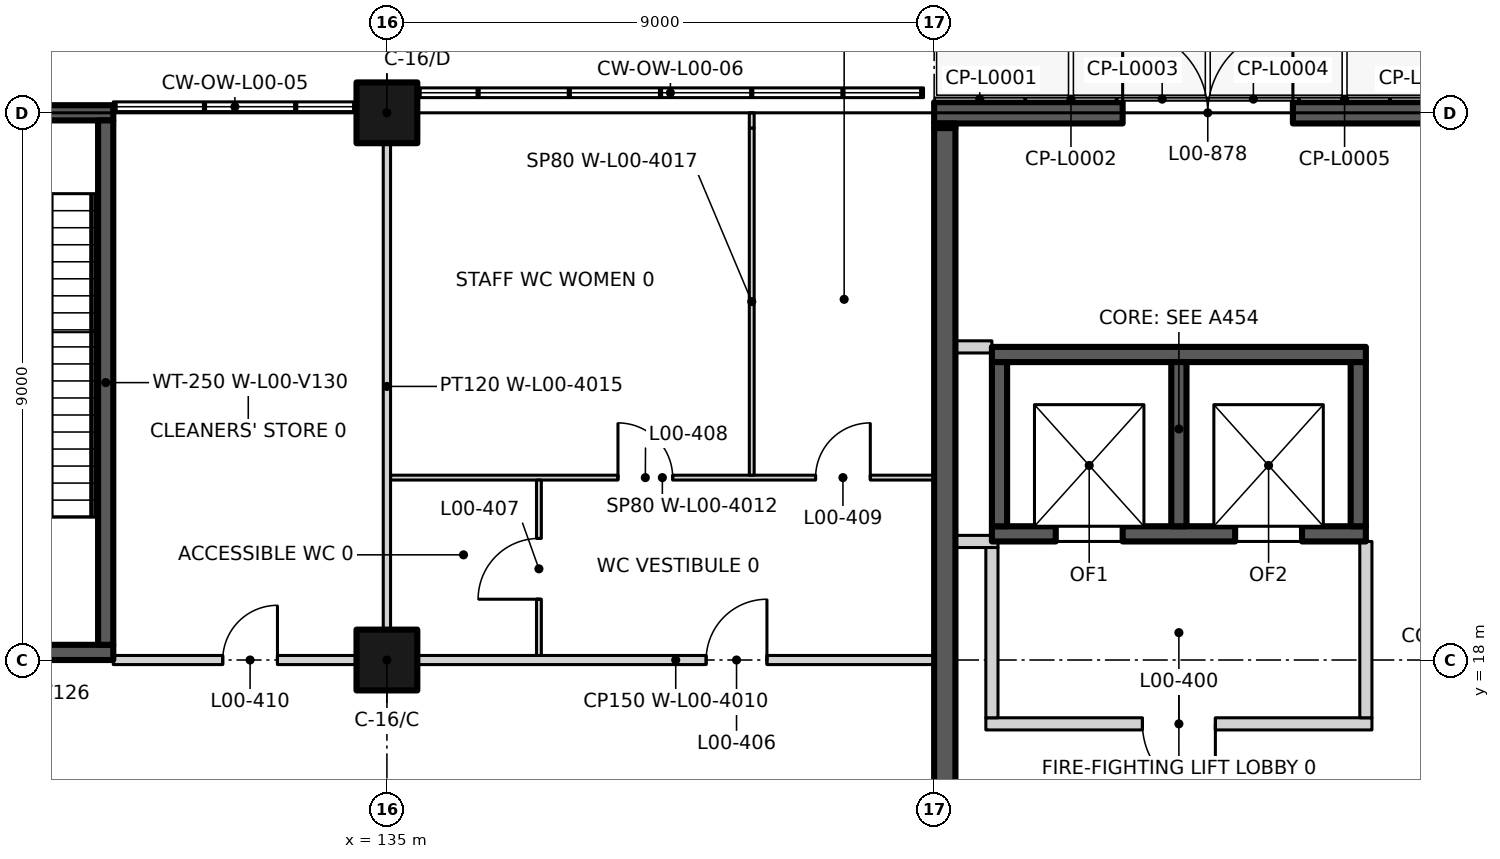
"""IFC4 building model, lengths in metres.
Left out: names, types, materials, properties, quantities, classifications, styles, units other than length and angle.
Written with IfcOpenShell. Run it as: python <this file> out.ifc"""

import sys

from ifc_helpers import new_model, si_unit, direction, frame, frame_2d, origin, origin_2d, place, context, subcontext, project, spatial, rectangle, extrude, element, fill, save


model = new_model("IFC4")
c1 = context("Model", 3, precision=1e-05, world=origin(), true_north=direction((0.0, 1.0)))
c2 = subcontext(c1, "Body", "Model", "MODEL_VIEW")
j1 = project(units=[si_unit("LENGTHUNIT", "METRE"), si_unit("PLANEANGLEUNIT", "RADIAN")], contexts=[c1])
p1 = place(None, origin())
s1 = spatial("IfcSite", under=j1, at=p1, CompositionType="ELEMENT")
p2 = place(p1, origin())
s2 = spatial("IfcBuilding", under=s1, at=p2, CompositionType="ELEMENT")
p3 = place(p2, origin())
s3 = spatial("IfcBuildingStorey", under=s2, at=p3, CompositionType="ELEMENT", Elevation=0.0)
for number, where, z_axis, x_axis in (
    (1, (135.0, 18.0, 0.0), (0.0, 0.0, 1.0), (1.0, 0.0, 0.0)),
    (2, (135.0, 27.0, 0.0), (0.0, 0.0, 1.0), (1.0, 0.0, 0.0)),
):
    element("IfcColumn", number, at=place(p3, frame(where, z_axis=z_axis, x_axis=x_axis)), inside=s3, PredefinedType="COLUMN", context=c2, shape_type="SweptSolid", body=[
        extrude(rectangle(XDim=1.0, YDim=1.0, at=origin_2d()), origin(), (0.0, 0.0, 1.0), 6.0),
    ])
p4 = place(p3, frame((126.5, 18.125, 0.0), z_axis=(0.0, 0.0, 1.0), x_axis=(1.0, 0.0, 0.0)))
e3 = element("IfcWall", 3, at=p4, inside=s3, PredefinedType="SHEAR", context=c2, shape_type="SweptSolid", body=[
    extrude(rectangle(XDim=4.0, YDim=0.25, at=frame_2d((2.0, 0.0))), origin(), (0.0, 0.0, 1.0), 6.0),
])
p5 = place(p4, frame((1.2, 0.0, 0.0)))
e4 = element("IfcOpeningElement", 4, at=p5, cuts=e3, PredefinedType="OPENING", context=c2, shape_type="SweptSolid", body=[
    extrude(rectangle(XDim=1.1, YDim=2.1, at=frame_2d((0.55, 1.05))), frame((0.0, 0.135, 0.0), z_axis=(0.0, -1.0, 0.0), x_axis=(1.0, 0.0, 0.0)), (0.0, 0.0, 1.0), 0.27),
])
p6 = place(p3, frame((128.188, 27.0, 0.0), z_axis=(0.0, 0.0, 1.0), x_axis=(1.0, 0.0, 0.0)))
e5 = element("IfcWall", 5, at=p6, inside=s3, PredefinedType="SHEAR", context=c2, shape_type="SweptSolid", body=[
    extrude(rectangle(XDim=2.312, YDim=0.25, at=frame_2d((1.156, 0.0))), origin(), (0.0, 0.0, 1.0), 6.0),
])
p7 = place(p3, frame((130.375, 18.25, 0.0), z_axis=(0.0, 0.0, 1.0), x_axis=(0.0, 1.0, 0.0)))
e6 = element("IfcWall", 6, at=p7, inside=s3, PredefinedType="SHEAR", context=c2, shape_type="SweptSolid", body=[
    extrude(rectangle(XDim=8.625, YDim=0.25, at=frame_2d((4.312, 0.0))), origin(), (0.0, 0.0, 1.0), 6.0),
])
p8 = place(p3, frame((144.95, 20.075, 0.0), z_axis=(0.0, 0.0, 1.0), x_axis=(1.0, 0.0, 0.0)))
e7 = element("IfcWall", 7, at=p8, inside=s3, PredefinedType="SHEAR", context=c2, shape_type="SweptSolid", body=[
    extrude(rectangle(XDim=6.15, YDim=0.25, at=frame_2d((3.075, 0.0))), origin(), (0.0, 0.0, 1.0), 6.0),
])
p9 = place(p8, frame((1.05, 0.0, 0.0)))
e8 = element("IfcOpeningElement", 8, at=p9, cuts=e7, PredefinedType="OPENING", context=c2, shape_type="SweptSolid", body=[
    extrude(rectangle(XDim=1.1, YDim=2.1, at=frame_2d((0.55, 1.05))), frame((0.0, 0.135, 0.0), z_axis=(0.0, -1.0, 0.0), x_axis=(1.0, 0.0, 0.0)), (0.0, 0.0, 1.0), 0.27),
])
p10 = place(p8, frame((4.0, 0.0, 0.0)))
e9 = element("IfcOpeningElement", 9, at=p10, cuts=e7, PredefinedType="OPENING", context=c2, shape_type="SweptSolid", body=[
    extrude(rectangle(XDim=1.1, YDim=2.1, at=frame_2d((0.55, 1.05))), frame((0.0, 0.135, 0.0), z_axis=(0.0, -1.0, 0.0), x_axis=(1.0, 0.0, 0.0)), (0.0, 0.0, 1.0), 0.27),
])
p11 = place(p3, frame((144.95, 23.025, 0.0), z_axis=(0.0, 0.0, 1.0), x_axis=(1.0, 0.0, 0.0)))
e10 = element("IfcWall", 10, at=p11, inside=s3, PredefinedType="SHEAR", context=c2, shape_type="SweptSolid", body=[
    extrude(rectangle(XDim=6.15, YDim=0.25, at=frame_2d((3.075, 0.0))), origin(), (0.0, 0.0, 1.0), 6.0),
])
for number, where, z_axis, x_axis in (
    (11, (145.075, 20.2, 0.0), (0.0, 0.0, 1.0), (0.0, 1.0, 0.0)),
    (12, (148.025, 20.2, 0.0), (0.0, 0.0, 1.0), (0.0, 1.0, 0.0)),
    (13, (150.975, 20.2, 0.0), (0.0, 0.0, 1.0), (0.0, 1.0, 0.0)),
):
    element("IfcWall", number, at=place(p3, frame(where, z_axis=z_axis, x_axis=x_axis)), inside=s3, PredefinedType="SHEAR", context=c2, shape_type="SweptSolid", body=[
        extrude(rectangle(XDim=2.7, YDim=0.25, at=frame_2d((1.35, 0.0))), origin(), (0.0, 0.0, 1.0), 6.0),
    ])
p12 = place(p3, frame((144.0, 27.0, 0.0), z_axis=(0.0, 0.0, 1.0), x_axis=(1.0, 0.0, 0.0)))
e14 = element("IfcWall", 14, at=p12, inside=s3, PredefinedType="SOLIDWALL", context=c2, shape_type="SweptSolid", body=[
    extrude(rectangle(XDim=18.0, YDim=0.35, at=frame_2d((9.0, 0.0))), origin(), (0.0, 0.0, 1.0), 5.1),
])
p13 = place(p12, frame((3.1, 0.0, 0.0)))
e15 = element("IfcOpeningElement", 15, at=p13, cuts=e14, PredefinedType="OPENING", context=c2, shape_type="SweptSolid", body=[
    extrude(rectangle(XDim=2.8, YDim=2.4, at=frame_2d((1.4, 1.2))), frame((0.0, 0.185, 0.0), z_axis=(0.0, -1.0, 0.0), x_axis=(1.0, 0.0, 0.0)), (0.0, 0.0, 1.0), 0.37),
])
p14 = place(p12, frame((13.2, 0.0, 0.6)))
e16 = element("IfcOpeningElement", 16, at=p14, cuts=e14, PredefinedType="OPENING", context=c2, shape_type="SweptSolid", body=[
    extrude(rectangle(XDim=0.6, YDim=2.4, at=frame_2d((0.3, 1.2))), frame((0.0, 0.185, 0.0), z_axis=(0.0, -1.0, 0.0), x_axis=(1.0, 0.0, 0.0)), (0.0, 0.0, 1.0), 0.37),
])
p15 = place(p3, frame((144.85, 16.95, 0.0), z_axis=(0.0, 0.0, 1.0), x_axis=(1.0, 0.0, 0.0)))
e17 = element("IfcWall", 17, at=p15, inside=s3, PredefinedType="PARTITIONING", context=c2, shape_type="SweptSolid", body=[
    extrude(rectangle(XDim=6.35, YDim=0.2, at=frame_2d((3.175, 0.0))), origin(), (0.0, 0.0, 1.0), 5.7),
])
p16 = place(p15, frame((3.775, 0.0, 0.0), z_axis=(0.0, 0.0, 1.0), x_axis=(-1.0, 0.0, 0.0)))
e18 = element("IfcOpeningElement", 18, at=p16, cuts=e17, PredefinedType="OPENING", context=c2, shape_type="SweptSolid", body=[
    extrude(rectangle(XDim=1.2, YDim=2.1, at=frame_2d((0.6, 1.05))), frame((0.0, 0.11, 0.0), z_axis=(0.0, -1.0, 0.0), x_axis=(1.0, 0.0, 0.0)), (0.0, 0.0, 1.0), 0.22),
])
p17 = place(p3, frame((130.5, 18.0, 0.0), z_axis=(0.0, 0.0, 1.0), x_axis=(1.0, 0.0, 0.0)))
e19 = element("IfcWall", 19, at=p17, inside=s3, PredefinedType="PARTITIONING", context=c2, shape_type="SweptSolid", body=[
    extrude(rectangle(XDim=4.0, YDim=0.15, at=frame_2d((2.0, 0.0))), origin(), (0.0, 0.0, 1.0), 5.7),
])
p18 = place(p17, frame((1.8, 0.0, 0.0)))
e20 = element("IfcOpeningElement", 20, at=p18, cuts=e19, PredefinedType="OPENING", context=c2, shape_type="SweptSolid", body=[
    extrude(rectangle(XDim=0.9, YDim=2.1, at=frame_2d((0.45, 1.05))), frame((0.0, 0.085, 0.0), z_axis=(0.0, -1.0, 0.0), x_axis=(1.0, 0.0, 0.0)), (0.0, 0.0, 1.0), 0.17),
])
p19 = place(p3, frame((135.5, 18.0, 0.0), z_axis=(0.0, 0.0, 1.0), x_axis=(1.0, 0.0, 0.0)))
e21 = element("IfcWall", 21, at=p19, inside=s3, PredefinedType="PARTITIONING", context=c2, shape_type="SweptSolid", body=[
    extrude(rectangle(XDim=8.5, YDim=0.15, at=frame_2d((4.25, 0.0))), origin(), (0.0, 0.0, 1.0), 5.7),
])
p20 = place(p19, frame((4.75, 0.0, 0.0)))
e22 = element("IfcOpeningElement", 22, at=p20, cuts=e21, PredefinedType="OPENING", context=c2, shape_type="SweptSolid", body=[
    extrude(rectangle(XDim=1.0, YDim=2.1, at=frame_2d((0.5, 1.05))), frame((0.0, 0.085, 0.0), z_axis=(0.0, -1.0, 0.0), x_axis=(1.0, 0.0, 0.0)), (0.0, 0.0, 1.0), 0.17),
])
p21 = place(p3, frame((144.35, 19.95, 0.0), z_axis=(0.0, 0.0, 1.0), x_axis=(1.0, 0.0, 0.0)))
e23 = element("IfcWall", 23, at=p21, inside=s3, PredefinedType="PARTITIONING", context=c2, shape_type="SweptSolid", body=[
    extrude(rectangle(XDim=0.7, YDim=0.2, at=frame_2d((0.35, 0.0))), origin(), (0.0, 0.0, 1.0), 5.7),
])
p22 = place(p3, frame((135.06, 21.0, 0.0), z_axis=(0.0, 0.0, 1.0), x_axis=(1.0, 0.0, 0.0)))
e24 = element("IfcWall", 24, at=p22, inside=s3, PredefinedType="PARTITIONING", context=c2, shape_type="SweptSolid", body=[
    extrude(rectangle(XDim=8.94, YDim=0.08, at=frame_2d((4.47, 0.0))), origin(), (0.0, 0.0, 1.0), 5.7),
])
p23 = place(p22, frame((3.74, 0.0, 0.0)))
e25 = element("IfcOpeningElement", 25, at=p23, cuts=e24, PredefinedType="OPENING", context=c2, shape_type="SweptSolid", body=[
    extrude(rectangle(XDim=0.9, YDim=2.1, at=frame_2d((0.45, 1.05))), frame((0.0, 0.05, 0.0), z_axis=(0.0, -1.0, 0.0), x_axis=(1.0, 0.0, 0.0)), (0.0, 0.0, 1.0), 0.1),
])
p24 = place(p22, frame((6.99, 0.0, 0.0)))
e26 = element("IfcOpeningElement", 26, at=p24, cuts=e24, PredefinedType="OPENING", context=c2, shape_type="SweptSolid", body=[
    extrude(rectangle(XDim=0.9, YDim=2.1, at=frame_2d((0.45, 1.05))), frame((0.0, 0.05, 0.0), z_axis=(0.0, -1.0, 0.0), x_axis=(1.0, 0.0, 0.0)), (0.0, 0.0, 1.0), 0.1),
])
p25 = place(p3, frame((144.35, 23.15, 0.0), z_axis=(0.0, 0.0, 1.0), x_axis=(1.0, 0.0, 0.0)))
e27 = element("IfcWall", 27, at=p25, inside=s3, PredefinedType="PARTITIONING", context=c2, shape_type="SweptSolid", body=[
    extrude(rectangle(XDim=0.6, YDim=0.2, at=frame_2d((0.3, 0.0))), origin(), (0.0, 0.0, 1.0), 5.7),
])
p26 = place(p3, frame((135.0, 18.5, 0.0), z_axis=(0.0, 0.0, 1.0), x_axis=(0.0, 1.0, 0.0)))
e28 = element("IfcWall", 28, at=p26, inside=s3, PredefinedType="PARTITIONING", context=c2, shape_type="SweptSolid", body=[
    extrude(rectangle(XDim=8.0, YDim=0.12, at=frame_2d((4.0, 0.0))), origin(), (0.0, 0.0, 1.0), 5.7),
])
p27 = place(p3, frame((137.5, 18.075, 0.0), z_axis=(0.0, 0.0, 1.0), x_axis=(0.0, 1.0, 0.0)))
e29 = element("IfcWall", 29, at=p27, inside=s3, PredefinedType="PARTITIONING", context=c2, shape_type="SweptSolid", body=[
    extrude(rectangle(XDim=2.885, YDim=0.08, at=frame_2d((1.442, 0.0))), origin(), (0.0, 0.0, 1.0), 5.7),
])
p28 = place(p27, frame((0.925, 0.0, 0.0)))
e30 = element("IfcOpeningElement", 30, at=p28, cuts=e29, PredefinedType="OPENING", context=c2, shape_type="SweptSolid", body=[
    extrude(rectangle(XDim=1.0, YDim=2.1, at=frame_2d((0.5, 1.05))), frame((0.0, 0.05, 0.0), z_axis=(0.0, -1.0, 0.0), x_axis=(1.0, 0.0, 0.0)), (0.0, 0.0, 1.0), 0.1),
])
p29 = place(p3, frame((141.0, 21.04, 0.0), z_axis=(0.0, 0.0, 1.0), x_axis=(0.0, 1.0, 0.0)))
e31 = element("IfcWall", 31, at=p29, inside=s3, PredefinedType="PARTITIONING", context=c2, shape_type="SweptSolid", body=[
    extrude(rectangle(XDim=5.71, YDim=0.08, at=frame_2d((2.855, 0.0))), origin(), (0.0, 0.0, 1.0), 5.7),
])
p30 = place(p3, frame((141.0, 26.75, 0.0), z_axis=(0.0, 0.0, 1.0), x_axis=(0.0, 1.0, 0.0)))
e32 = element("IfcWall", 32, at=p30, inside=s3, PredefinedType="PARTITIONING", context=c2, shape_type="SweptSolid", body=[
    extrude(rectangle(XDim=0.25, YDim=0.08, at=frame_2d((0.125, 0.0))), origin(), (0.0, 0.0, 1.0), 5.1),
])
p31 = place(p3, frame((144.175, 9.35, 0.0), z_axis=(0.0, 0.0, 1.0), x_axis=(0.0, 1.0, 0.0)))
e33 = element("IfcWall", 33, at=p31, inside=s3, PredefinedType="SHEAR", context=c2, shape_type="SweptSolid", body=[
    extrude(rectangle(XDim=17.4, YDim=0.35, at=frame_2d((8.7, 0.0))), origin(), (0.0, 0.0, 1.0), 5.7),
])
p32 = place(p31, frame((3.75, 0.0, 0.0)))
e34 = element("IfcOpeningElement", 34, at=p32, cuts=e33, PredefinedType="OPENING", context=c2, shape_type="SweptSolid", body=[
    extrude(rectangle(XDim=1.6, YDim=2.4, at=frame_2d((0.8, 1.2))), frame((0.0, 0.185, 0.0), z_axis=(0.0, -1.0, 0.0), x_axis=(1.0, 0.0, 0.0)), (0.0, 0.0, 1.0), 0.37),
])
p33 = place(p3, frame((144.175, 26.75, 0.0), z_axis=(0.0, 0.0, 1.0), x_axis=(0.0, 1.0, 0.0)))
e35 = element("IfcWall", 35, at=p33, inside=s3, PredefinedType="SHEAR", context=c2, shape_type="SweptSolid", body=[
    extrude(rectangle(XDim=0.075, YDim=0.35, at=frame_2d((0.038, 0.0))), origin(), (0.0, 0.0, 1.0), 5.1),
])
p34 = place(p3, frame((144.95, 17.05, 0.0), z_axis=(0.0, 0.0, 1.0), x_axis=(0.0, 1.0, 0.0)))
e36 = element("IfcWall", 36, at=p34, inside=s3, PredefinedType="PARTITIONING", context=c2, shape_type="SweptSolid", body=[
    extrude(rectangle(XDim=2.8, YDim=0.2, at=frame_2d((1.4, 0.0))), origin(), (0.0, 0.0, 1.0), 5.7),
])
p35 = place(p3, frame((151.1, 17.05, 0.0), z_axis=(0.0, 0.0, 1.0), x_axis=(0.0, 1.0, 0.0)))
e37 = element("IfcWall", 37, at=p35, inside=s3, PredefinedType="PARTITIONING", context=c2, shape_type="SweptSolid", body=[
    extrude(rectangle(XDim=2.9, YDim=0.2, at=frame_2d((1.45, 0.0))), origin(), (0.0, 0.0, 1.0), 5.7),
])
p36 = place(p9, origin())
e38 = element("IfcDoor", 38, at=p36, inside=s3, OperationType="DOUBLE_DOOR_SLIDING", PredefinedType="DOOR", context=c2, shape_type="SweptSolid", body=[
    extrude(rectangle(XDim=1.1, YDim=2.1, at=frame_2d((0.55, 1.05))), frame((0.0, 0.025, 0.0), z_axis=(0.0, -1.0, 0.0), x_axis=(1.0, 0.0, 0.0)), (0.0, 0.0, 1.0), 0.05),
])
fill(e8, e38)
p37 = place(p10, origin())
e39 = element("IfcDoor", 39, at=p37, inside=s3, OperationType="DOUBLE_DOOR_SLIDING", PredefinedType="DOOR", context=c2, shape_type="SweptSolid", body=[
    extrude(rectangle(XDim=1.1, YDim=2.1, at=frame_2d((0.55, 1.05))), frame((0.0, 0.025, 0.0), z_axis=(0.0, -1.0, 0.0), x_axis=(1.0, 0.0, 0.0)), (0.0, 0.0, 1.0), 0.05),
])
fill(e9, e39)
p38 = place(p13, origin())
e40 = element("IfcDoor", 40, at=p38, inside=s3, OperationType="DOUBLE_DOOR_SINGLE_SWING", PredefinedType="DOOR", context=c2, shape_type="SweptSolid", body=[
    extrude(rectangle(XDim=2.8, YDim=2.4, at=frame_2d((1.4, 1.2))), frame((0.0, 0.025, 0.0), z_axis=(0.0, -1.0, 0.0), x_axis=(1.0, 0.0, 0.0)), (0.0, 0.0, 1.0), 0.05),
])
fill(e15, e40)
p39 = place(p16, origin())
e41 = element("IfcDoor", 41, at=p39, inside=s3, OperationType="SINGLE_SWING_LEFT", PredefinedType="DOOR", context=c2, shape_type="SweptSolid", body=[
    extrude(rectangle(XDim=1.2, YDim=2.1, at=frame_2d((0.6, 1.05))), frame((0.0, 0.025, 0.0), z_axis=(0.0, -1.0, 0.0), x_axis=(1.0, 0.0, 0.0)), (0.0, 0.0, 1.0), 0.05),
])
fill(e18, e41)
p40 = place(p20, origin())
e42 = element("IfcDoor", 42, at=p40, inside=s3, OperationType="SINGLE_SWING_RIGHT", PredefinedType="DOOR", context=c2, shape_type="SweptSolid", body=[
    extrude(rectangle(XDim=1.0, YDim=2.1, at=frame_2d((0.5, 1.05))), frame((0.0, 0.025, 0.0), z_axis=(0.0, -1.0, 0.0), x_axis=(1.0, 0.0, 0.0)), (0.0, 0.0, 1.0), 0.05),
])
fill(e22, e42)
p41 = place(p28, origin())
e43 = element("IfcDoor", 43, at=p41, inside=s3, OperationType="SINGLE_SWING_LEFT", PredefinedType="DOOR", context=c2, shape_type="SweptSolid", body=[
    extrude(rectangle(XDim=1.0, YDim=2.1, at=frame_2d((0.5, 1.05))), frame((0.0, 0.025, 0.0), z_axis=(0.0, -1.0, 0.0), x_axis=(1.0, 0.0, 0.0)), (0.0, 0.0, 1.0), 0.05),
])
fill(e30, e43)
p42 = place(p23, origin())
e44 = element("IfcDoor", 44, at=p42, inside=s3, OperationType="SINGLE_SWING_LEFT", PredefinedType="DOOR", context=c2, shape_type="SweptSolid", body=[
    extrude(rectangle(XDim=0.9, YDim=2.1, at=frame_2d((0.45, 1.05))), frame((0.0, 0.025, 0.0), z_axis=(0.0, -1.0, 0.0), x_axis=(1.0, 0.0, 0.0)), (0.0, 0.0, 1.0), 0.05),
])
fill(e25, e44)
p43 = place(p24, origin())
e45 = element("IfcDoor", 45, at=p43, inside=s3, OperationType="SINGLE_SWING_RIGHT", PredefinedType="DOOR", context=c2, shape_type="SweptSolid", body=[
    extrude(rectangle(XDim=0.9, YDim=2.1, at=frame_2d((0.45, 1.05))), frame((0.0, 0.025, 0.0), z_axis=(0.0, -1.0, 0.0), x_axis=(1.0, 0.0, 0.0)), (0.0, 0.0, 1.0), 0.05),
])
fill(e26, e45)
p44 = place(p18, origin())
e46 = element("IfcDoor", 46, at=p44, inside=s3, OperationType="SINGLE_SWING_RIGHT", PredefinedType="DOOR", context=c2, shape_type="SweptSolid", body=[
    extrude(rectangle(XDim=0.9, YDim=2.1, at=frame_2d((0.45, 1.05))), frame((0.0, 0.025, 0.0), z_axis=(0.0, -1.0, 0.0), x_axis=(1.0, 0.0, 0.0)), (0.0, 0.0, 1.0), 0.05),
])
fill(e20, e46)
save(model, sys.argv[1])
